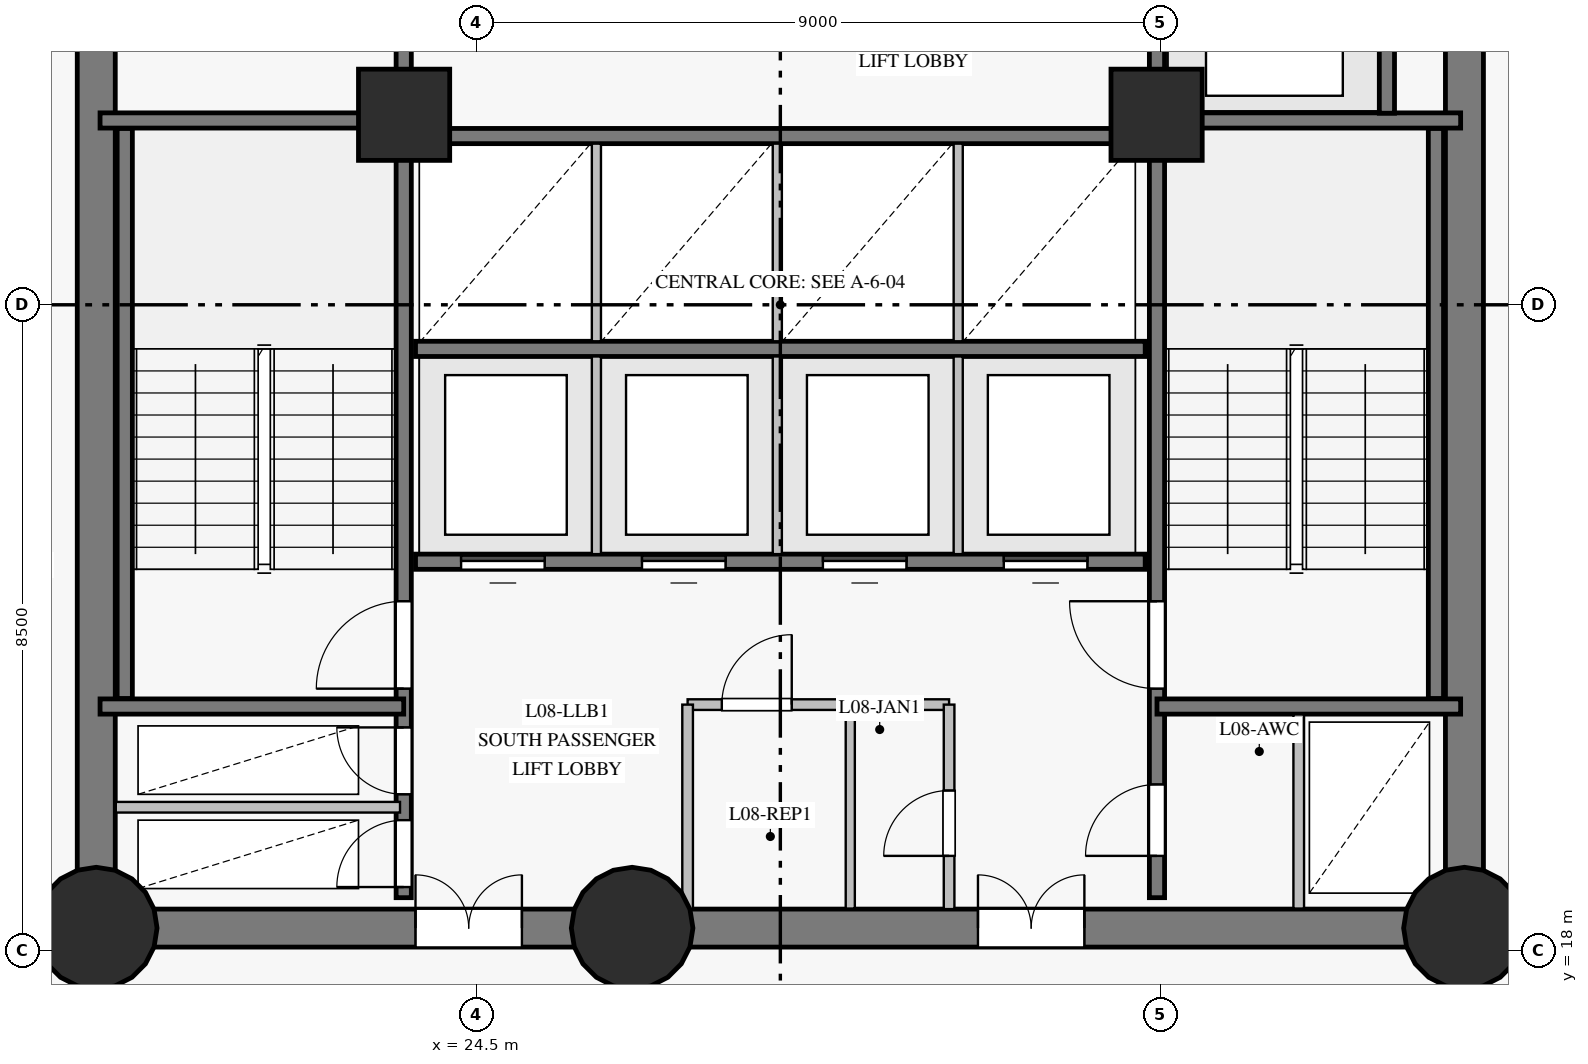
"""IFC4 building model, lengths in metres.
Left out: names, types, materials, properties, quantities, classifications, styles, units other than length and angle.
Written with IfcOpenShell. Run it as: python <this file> out.ifc"""

import sys

from ifc_helpers import new_model, si_unit, direction, frame, frame_2d, origin, origin_with_axes, origin_2d, place, context, subcontext, project, spatial, rectangle, circle, extrude, source, transform, mapped, element, fill, save


model = new_model("IFC4")
c1 = context("Model", 3, precision=1e-05, world=origin(), true_north=direction((0.0, 1.0)))
c2 = subcontext(c1, "Body", "Model", "MODEL_VIEW")
j1 = project(units=[si_unit("LENGTHUNIT", "METRE"), si_unit("PLANEANGLEUNIT", "RADIAN")], contexts=[c1])
p1 = place(None, origin())
s1 = spatial("IfcSite", under=j1, at=p1, CompositionType="ELEMENT")
p2 = place(p1, origin())
s2 = spatial("IfcBuilding", under=s1, at=p2, CompositionType="ELEMENT")
p3 = place(p2, frame((0.0, 0.0, 33.7)))
s3 = spatial("IfcBuildingStorey", under=s2, at=p3, CompositionType="ELEMENT", Elevation=33.7)
p4 = place(p3, frame((19.5, 18.3, 0.0), z_axis=(0.0, 0.0, 1.0), x_axis=(1.0, 0.0, 0.0)))
e1 = element("IfcWall", 1, at=p4, inside=s3, PredefinedType="SHEAR", context=c2, shape_type="SweptSolid", body=[
    extrude(rectangle(XDim=7.05, YDim=0.5, at=frame_2d((3.525, 0.0))), origin(), (0.0, 0.0, 1.0), 3.35),
])
p5 = place(p4, frame((4.2, 0.0, 0.0)))
e2 = element("IfcOpeningElement", 2, at=p5, cuts=e1, PredefinedType="OPENING", context=c2, shape_type="SweptSolid", body=[
    extrude(rectangle(XDim=1.4, YDim=2.2, at=frame_2d((0.7, 1.1))), frame((0.0, 0.26, 0.0), z_axis=(0.0, -1.0, 0.0), x_axis=(1.0, 0.0, 0.0)), (0.0, 0.0, 1.0), 0.52),
])
p6 = place(p3, frame((26.55, 18.3, 0.0), z_axis=(0.0, 0.0, 1.0), x_axis=(1.0, 0.0, 0.0)))
e3 = element("IfcWall", 3, at=p6, inside=s3, PredefinedType="SHEAR", context=c2, shape_type="SweptSolid", body=[
    extrude(rectangle(XDim=10.95, YDim=0.5, at=frame_2d((5.475, 0.0))), origin(), (0.0, 0.0, 1.0), 3.35),
])
p7 = place(p6, frame((4.55, 0.0, 0.0)))
e4 = element("IfcOpeningElement", 4, at=p7, cuts=e3, PredefinedType="OPENING", context=c2, shape_type="SweptSolid", body=[
    extrude(rectangle(XDim=1.4, YDim=2.2, at=frame_2d((0.7, 1.1))), frame((0.0, 0.26, 0.0), z_axis=(0.0, -1.0, 0.0), x_axis=(1.0, 0.0, 0.0)), (0.0, 0.0, 1.0), 0.52),
])
p8 = place(p3, frame((37.5, 18.3, 0.0), z_axis=(0.0, 0.0, 1.0), x_axis=(0.0, 1.0, 0.0)))
e5 = element("IfcWall", 5, at=p8, inside=s3, PredefinedType="SHEAR", context=c2, shape_type="SweptSolid", body=[
    extrude(rectangle(XDim=16.4, YDim=0.5, at=frame_2d((8.2, 0.0))), origin(), (0.0, 0.0, 1.0), 3.35),
])
p9 = place(p8, frame((14.06, 0.0, 0.0)))
e6 = element("IfcOpeningElement", 6, at=p9, cuts=e5, PredefinedType="OPENING", context=c2, shape_type="SweptSolid", body=[
    extrude(rectangle(XDim=1.2, YDim=2.15, at=frame_2d((0.6, 1.075))), frame((0.0, 0.26, 0.0), z_axis=(0.0, -1.0, 0.0), x_axis=(1.0, 0.0, 0.0)), (0.0, 0.0, 1.0), 0.52),
])
p10 = place(p3, frame((19.5, 34.7, 0.0), z_axis=(0.0, 0.0, 1.0), x_axis=(0.0, -1.0, 0.0)))
e7 = element("IfcWall", 7, at=p10, inside=s3, PredefinedType="SHEAR", context=c2, shape_type="SweptSolid", body=[
    extrude(rectangle(XDim=16.4, YDim=0.5, at=frame_2d((8.2, 0.0))), origin(), (0.0, 0.0, 1.0), 3.35),
])
p11 = place(p10, frame((3.1, 0.0, 0.0)))
e8 = element("IfcOpeningElement", 8, at=p11, cuts=e7, PredefinedType="OPENING", context=c2, shape_type="SweptSolid", body=[
    extrude(rectangle(XDim=1.1, YDim=2.15, at=frame_2d((0.55, 1.075))), frame((0.0, 0.26, 0.0), z_axis=(0.0, -1.0, 0.0), x_axis=(1.0, 0.0, 0.0)), (0.0, 0.0, 1.0), 0.52),
])
m1 = source(origin_with_axes(), c2, "Body", "SweptSolid", [
    extrude(circle(Radius=0.8, at=origin_2d()), origin(), (0.0, 0.0, 1.0), 3.6),
])
for number, where, z_axis, x_axis in (
    (9, (19.5, 18.3, 0.0), (0.0, 0.0, 1.0), (1.0, 0.0, 0.0)),
    (10, (26.55, 18.3, 0.0), (0.0, 0.0, 1.0), (1.0, 0.0, 0.0)),
    (11, (37.5, 18.3, 0.0), (0.0, 0.0, 1.0), (1.0, 0.0, 0.0)),
):
    element("IfcColumn", number, at=place(p3, frame(where, z_axis=z_axis, x_axis=x_axis)), inside=s3, PredefinedType="COLUMN", context=c2, shape_type="MappedRepresentation", body=[
        mapped(m1, transform((0.0, 0.0, 0.0), scale=1.0)),
    ])
m2 = source(origin_with_axes(), c2, "Body", "SweptSolid", [
    extrude(rectangle(XDim=1.2, YDim=1.2, at=origin_2d()), origin(), (0.0, 0.0, 1.0), 3.6),
])
for number, where, z_axis, x_axis in (
    (12, (23.55, 29.0, 0.0), (0.0, 0.0, 1.0), (1.0, 0.0, 0.0)),
    (13, (33.45, 29.0, 0.0), (0.0, 0.0, 1.0), (1.0, 0.0, 0.0)),
):
    element("IfcColumn", number, at=place(p3, frame(where, z_axis=z_axis, x_axis=x_axis)), inside=s3, PredefinedType="COLUMN", context=c2, shape_type="MappedRepresentation", body=[
        mapped(m2, transform((0.0, 0.0, 0.0), scale=1.0)),
    ])
p12 = place(p3, frame((23.545, 18.7, 0.0), z_axis=(0.0, 0.0, 1.0), x_axis=(0.0, 1.0, 0.0)))
e14 = element("IfcWall", 14, at=p12, inside=s3, PredefinedType="SHEAR", context=c2, shape_type="SweptSolid", body=[
    extrude(rectangle(XDim=15.6, YDim=0.2, at=frame_2d((7.8, 0.0))), origin(), (0.0, 0.0, 1.0), 3.35),
])
p13 = place(p12, frame((2.75, 0.0, 0.0)))
e15 = element("IfcOpeningElement", 15, at=p13, cuts=e14, PredefinedType="OPENING", context=c2, shape_type="SweptSolid", body=[
    extrude(rectangle(XDim=1.15, YDim=2.15, at=frame_2d((0.575, 1.075))), frame((0.0, 0.11, 0.0), z_axis=(0.0, -1.0, 0.0), x_axis=(1.0, 0.0, 0.0)), (0.0, 0.0, 1.0), 0.22),
])
p14 = place(p12, frame((0.14, 0.0, 0.0)))
e16 = element("IfcOpeningElement", 16, at=p14, cuts=e14, PredefinedType="OPENING", context=c2, shape_type="SweptSolid", body=[
    extrude(rectangle(XDim=0.88, YDim=2.1, at=frame_2d((0.44, 1.05))), frame((0.0, 0.11, 0.0), z_axis=(0.0, -1.0, 0.0), x_axis=(1.0, 0.0, 0.0)), (0.0, 0.0, 1.0), 0.22),
])
p15 = place(p12, frame((1.36, 0.0, 0.0)))
e17 = element("IfcOpeningElement", 17, at=p15, cuts=e14, PredefinedType="OPENING", context=c2, shape_type="SweptSolid", body=[
    extrude(rectangle(XDim=0.88, YDim=2.1, at=frame_2d((0.44, 1.05))), frame((0.0, 0.11, 0.0), z_axis=(0.0, -1.0, 0.0), x_axis=(1.0, 0.0, 0.0)), (0.0, 0.0, 1.0), 0.22),
])
p16 = place(p12, frame((12.1, 0.0, 0.0)))
e18 = element("IfcOpeningElement", 18, at=p16, cuts=e14, PredefinedType="OPENING", context=c2, shape_type="SweptSolid", body=[
    extrude(rectangle(XDim=1.12, YDim=2.15, at=frame_2d((0.56, 1.075))), frame((0.0, 0.11, 0.0), z_axis=(0.0, -1.0, 0.0), x_axis=(1.0, 0.0, 0.0)), (0.0, 0.0, 1.0), 0.22),
])
p17 = place(p12, frame((14.05, 0.0, 0.0)))
e19 = element("IfcOpeningElement", 19, at=p17, cuts=e14, PredefinedType="OPENING", context=c2, shape_type="SweptSolid", body=[
    extrude(rectangle(XDim=1.12, YDim=2.15, at=frame_2d((0.56, 1.075))), frame((0.0, 0.11, 0.0), z_axis=(0.0, -1.0, 0.0), x_axis=(1.0, 0.0, 0.0)), (0.0, 0.0, 1.0), 0.22),
])
p18 = place(p3, frame((33.455, 18.7, 0.0), z_axis=(0.0, 0.0, 1.0), x_axis=(0.0, 1.0, 0.0)))
e20 = element("IfcWall", 20, at=p18, inside=s3, PredefinedType="SHEAR", context=c2, shape_type="SweptSolid", body=[
    extrude(rectangle(XDim=15.6, YDim=0.2, at=frame_2d((7.8, 0.0))), origin(), (0.0, 0.0, 1.0), 3.35),
])
p19 = place(p18, frame((2.75, 0.0, 0.0)))
e21 = element("IfcOpeningElement", 21, at=p19, cuts=e20, PredefinedType="OPENING", context=c2, shape_type="SweptSolid", body=[
    extrude(rectangle(XDim=1.15, YDim=2.15, at=frame_2d((0.575, 1.075))), frame((0.0, 0.11, 0.0), z_axis=(0.0, -1.0, 0.0), x_axis=(1.0, 0.0, 0.0)), (0.0, 0.0, 1.0), 0.22),
])
p20 = place(p18, frame((0.55, 0.0, 0.0)))
e22 = element("IfcOpeningElement", 22, at=p20, cuts=e20, PredefinedType="OPENING", context=c2, shape_type="SweptSolid", body=[
    extrude(rectangle(XDim=0.94, YDim=2.1, at=frame_2d((0.47, 1.05))), frame((0.0, 0.11, 0.0), z_axis=(0.0, -1.0, 0.0), x_axis=(1.0, 0.0, 0.0)), (0.0, 0.0, 1.0), 0.22),
])
p21 = place(p3, frame((23.7, 23.12, 0.0), z_axis=(0.0, 0.0, 1.0), x_axis=(1.0, 0.0, 0.0)))
e23 = element("IfcWall", 23, at=p21, inside=s3, PredefinedType="SHEAR", context=c2, shape_type="SweptSolid", body=[
    extrude(rectangle(XDim=9.6, YDim=0.2, at=frame_2d((4.8, 0.0))), origin(), (0.0, 0.0, 1.0), 3.35),
])
p22 = place(p21, frame((0.6, 0.0, 0.0)))
e24 = element("IfcOpeningElement", 24, at=p22, cuts=e23, PredefinedType="OPENING", context=c2, shape_type="SweptSolid", body=[
    extrude(rectangle(XDim=1.1, YDim=2.15, at=frame_2d((0.55, 1.075))), frame((0.0, 0.11, 0.0), z_axis=(0.0, -1.0, 0.0), x_axis=(1.0, 0.0, 0.0)), (0.0, 0.0, 1.0), 0.22),
])
p23 = place(p21, frame((2.98, 0.0, 0.0)))
e25 = element("IfcOpeningElement", 25, at=p23, cuts=e23, PredefinedType="OPENING", context=c2, shape_type="SweptSolid", body=[
    extrude(rectangle(XDim=1.1, YDim=2.15, at=frame_2d((0.55, 1.075))), frame((0.0, 0.11, 0.0), z_axis=(0.0, -1.0, 0.0), x_axis=(1.0, 0.0, 0.0)), (0.0, 0.0, 1.0), 0.22),
])
p24 = place(p21, frame((5.36, 0.0, 0.0)))
e26 = element("IfcOpeningElement", 26, at=p24, cuts=e23, PredefinedType="OPENING", context=c2, shape_type="SweptSolid", body=[
    extrude(rectangle(XDim=1.1, YDim=2.15, at=frame_2d((0.55, 1.075))), frame((0.0, 0.11, 0.0), z_axis=(0.0, -1.0, 0.0), x_axis=(1.0, 0.0, 0.0)), (0.0, 0.0, 1.0), 0.22),
])
p25 = place(p21, frame((7.74, 0.0, 0.0)))
e27 = element("IfcOpeningElement", 27, at=p25, cuts=e23, PredefinedType="OPENING", context=c2, shape_type="SweptSolid", body=[
    extrude(rectangle(XDim=1.1, YDim=2.15, at=frame_2d((0.55, 1.075))), frame((0.0, 0.11, 0.0), z_axis=(0.0, -1.0, 0.0), x_axis=(1.0, 0.0, 0.0)), (0.0, 0.0, 1.0), 0.22),
])
for number, where, z_axis, x_axis in (
    (28, (23.7, 25.92, 0.0), (0.0, 0.0, 1.0), (1.0, 0.0, 0.0)),
    (29, (23.7, 28.72, 0.0), (0.0, 0.0, 1.0), (1.0, 0.0, 0.0)),
):
    element("IfcWall", number, at=place(p3, frame(where, z_axis=z_axis, x_axis=x_axis)), inside=s3, PredefinedType="SHEAR", context=c2, shape_type="SweptSolid", body=[
        extrude(rectangle(XDim=9.6, YDim=0.2, at=frame_2d((4.8, 0.0))), origin(), (0.0, 0.0, 1.0), 3.35),
    ])
for number, where, z_axis, x_axis in (
    (30, (19.875, 21.32, 0.0), (0.0, 0.0, 1.0), (0.0, 1.0, 0.0)),
    (31, (37.125, 21.32, 0.0), (0.0, 0.0, 1.0), (0.0, 1.0, 0.0)),
):
    element("IfcWall", number, at=place(p3, frame(where, z_axis=z_axis, x_axis=x_axis)), inside=s3, PredefinedType="SHEAR", context=c2, shape_type="SweptSolid", body=[
        extrude(rectangle(XDim=7.5, YDim=0.2, at=frame_2d((3.75, 0.0))), origin(), (0.0, 0.0, 1.0), 3.35),
    ])
for number, where, z_axis, x_axis in (
    (32, (33.455, 21.215, 0.0), (0.0, 0.0, 1.0), (1.0, 0.0, 0.0)),
    (33, (33.455, 28.925, 0.0), (0.0, 0.0, 1.0), (1.0, 0.0, 0.0)),
    (34, (19.55, 21.215, 0.0), (0.0, 0.0, 1.0), (1.0, 0.0, 0.0)),
    (35, (19.55, 28.925, 0.0), (0.0, 0.0, 1.0), (1.0, 0.0, 0.0)),
):
    element("IfcWall", number, at=place(p3, frame(where, z_axis=z_axis, x_axis=x_axis)), inside=s3, PredefinedType="SHEAR", context=c2, shape_type="SweptSolid", body=[
        extrude(rectangle(XDim=3.995, YDim=0.2, at=frame_2d((1.998, 0.0))), origin(), (0.0, 0.0, 1.0), 3.35),
    ])
p26 = place(p3, frame((36.48, 29.02, 0.0), z_axis=(0.0, 0.0, 1.0), x_axis=(0.0, 1.0, 0.0)))
e36 = element("IfcWall", 36, at=p26, inside=s3, PredefinedType="SHEAR", context=c2, shape_type="SweptSolid", body=[
    extrude(rectangle(XDim=2.86, YDim=0.2, at=frame_2d((1.43, 0.0))), origin(), (0.0, 0.0, 1.0), 3.35),
])
p27 = place(p3, frame((19.757, 19.89, 0.0), z_axis=(0.0, 0.0, 1.0), x_axis=(1.0, 0.0, 0.0)))
e37 = element("IfcWall", 37, at=p27, inside=s3, PredefinedType="PARTITIONING", context=c2, shape_type="SweptSolid", body=[
    extrude(rectangle(XDim=3.739, YDim=0.14, at=frame_2d((1.87, 0.0))), origin(), (0.0, 0.0, 1.0), 3.35),
])
p28 = place(p3, frame((27.28, 21.24, 0.0), z_axis=(0.0, 0.0, 1.0), x_axis=(1.0, 0.0, 0.0)))
e38 = element("IfcWall", 38, at=p28, inside=s3, PredefinedType="PARTITIONING", context=c2, shape_type="SweptSolid", body=[
    extrude(rectangle(XDim=3.44, YDim=0.14, at=frame_2d((1.72, 0.0))), origin(), (0.0, 0.0, 1.0), 3.35),
])
p29 = place(p28, frame((0.45, 0.0, 0.0)))
e39 = element("IfcOpeningElement", 39, at=p29, cuts=e38, PredefinedType="OPENING", context=c2, shape_type="SweptSolid", body=[
    extrude(rectangle(XDim=0.92, YDim=2.1, at=frame_2d((0.46, 1.05))), frame((0.0, 0.08, 0.0), z_axis=(0.0, -1.0, 0.0), x_axis=(1.0, 0.0, 0.0)), (0.0, 0.0, 1.0), 0.16),
])
p30 = place(p3, frame((27.28, 18.55, 0.0), z_axis=(0.0, 0.0, 1.0), x_axis=(0.0, 1.0, 0.0)))
e40 = element("IfcWall", 40, at=p30, inside=s3, PredefinedType="PARTITIONING", context=c2, shape_type="SweptSolid", body=[
    extrude(rectangle(XDim=2.69, YDim=0.14, at=frame_2d((1.345, 0.0))), origin(), (0.0, 0.0, 1.0), 3.35),
])
p31 = place(p3, frame((30.72, 18.55, 0.0), z_axis=(0.0, 0.0, 1.0), x_axis=(0.0, 1.0, 0.0)))
e41 = element("IfcWall", 41, at=p31, inside=s3, PredefinedType="PARTITIONING", context=c2, shape_type="SweptSolid", body=[
    extrude(rectangle(XDim=2.69, YDim=0.14, at=frame_2d((1.345, 0.0))), origin(), (0.0, 0.0, 1.0), 3.35),
])
p32 = place(p31, frame((0.7, 0.0, 0.0)))
e42 = element("IfcOpeningElement", 42, at=p32, cuts=e41, PredefinedType="OPENING", context=c2, shape_type="SweptSolid", body=[
    extrude(rectangle(XDim=0.86, YDim=2.1, at=frame_2d((0.43, 1.05))), frame((0.0, 0.08, 0.0), z_axis=(0.0, -1.0, 0.0), x_axis=(1.0, 0.0, 0.0)), (0.0, 0.0, 1.0), 0.16),
])
for number, where, z_axis, x_axis in (
    (43, (26.08, 23.22, 0.0), (0.0, 0.0, 1.0), (0.0, 1.0, 0.0)),
    (44, (28.46, 23.22, 0.0), (0.0, 0.0, 1.0), (0.0, 1.0, 0.0)),
    (45, (30.84, 23.22, 0.0), (0.0, 0.0, 1.0), (0.0, 1.0, 0.0)),
    (46, (26.08, 26.02, 0.0), (0.0, 0.0, 1.0), (0.0, 1.0, 0.0)),
    (47, (28.46, 26.02, 0.0), (0.0, 0.0, 1.0), (0.0, 1.0, 0.0)),
    (48, (30.84, 26.02, 0.0), (0.0, 0.0, 1.0), (0.0, 1.0, 0.0)),
):
    element("IfcWall", number, at=place(p3, frame(where, z_axis=z_axis, x_axis=x_axis)), inside=s3, PredefinedType="PARTITIONING", context=c2, shape_type="SweptSolid", body=[
        extrude(rectangle(XDim=2.6, YDim=0.12, at=frame_2d((1.3, 0.0))), origin(), (0.0, 0.0, 1.0), 3.35),
    ])
p33 = place(p3, frame((29.42, 18.557, 0.0), z_axis=(0.0, 0.0, 1.0), x_axis=(0.0, 1.0, 0.0)))
e49 = element("IfcWall", 49, at=p33, inside=s3, PredefinedType="PARTITIONING", context=c2, shape_type="SweptSolid", body=[
    extrude(rectangle(XDim=2.611, YDim=0.12, at=frame_2d((1.306, 0.0))), origin(), (0.0, 0.0, 1.0), 3.35),
])
p34 = place(p3, frame((35.32, 18.557, 0.0), z_axis=(0.0, 0.0, 1.0), x_axis=(0.0, 1.0, 0.0)))
e50 = element("IfcWall", 50, at=p34, inside=s3, PredefinedType="PARTITIONING", context=c2, shape_type="SweptSolid", body=[
    extrude(rectangle(XDim=2.553, YDim=0.14, at=frame_2d((1.277, 0.0))), origin(), (0.0, 0.0, 1.0), 3.35),
])
m3 = source(origin_with_axes(), c2, "Body", "SweptSolid", [
    extrude(rectangle(XDim=1.15, YDim=2.15, at=frame_2d((0.575, 1.075))), frame((0.0, 0.025, 0.0), z_axis=(0.0, -1.0, 0.0), x_axis=(1.0, 0.0, 0.0)), (0.0, 0.0, 1.0), 0.05),
])
p35 = place(p13, origin())
e51 = element("IfcDoor", 51, at=p35, inside=s3, OperationType="SINGLE_SWING_LEFT", PredefinedType="DOOR", context=c2, shape_type="MappedRepresentation", body=[
    mapped(m3, transform((0.0, 0.0, 0.0), scale=1.0)),
])
fill(e15, e51)
p36 = place(p19, origin())
e52 = element("IfcDoor", 52, at=p36, inside=s3, OperationType="SINGLE_SWING_RIGHT", PredefinedType="DOOR", context=c2, shape_type="MappedRepresentation", body=[
    mapped(m3, transform((0.0, 0.0, 0.0), scale=1.0)),
])
fill(e21, e52)
m4 = source(origin_with_axes(), c2, "Body", "SweptSolid", [
    extrude(rectangle(XDim=0.88, YDim=2.1, at=frame_2d((0.44, 1.05))), frame((0.0, 0.025, 0.0), z_axis=(0.0, -1.0, 0.0), x_axis=(1.0, 0.0, 0.0)), (0.0, 0.0, 1.0), 0.05),
])
p37 = place(p14, origin())
e53 = element("IfcDoor", 53, at=p37, inside=s3, OperationType="SINGLE_SWING_LEFT", PredefinedType="DOOR", context=c2, shape_type="MappedRepresentation", body=[
    mapped(m4, transform((0.0, 0.0, 0.0), scale=1.0)),
])
fill(e16, e53)
p38 = place(p15, origin())
e54 = element("IfcDoor", 54, at=p38, inside=s3, OperationType="SINGLE_SWING_RIGHT", PredefinedType="DOOR", context=c2, shape_type="MappedRepresentation", body=[
    mapped(m4, transform((0.0, 0.0, 0.0), scale=1.0)),
])
fill(e17, e54)
m5 = source(origin_with_axes(), c2, "Body", "SweptSolid", [
    extrude(rectangle(XDim=1.4, YDim=2.2, at=frame_2d((0.7, 1.1))), frame((0.0, 0.025, 0.0), z_axis=(0.0, -1.0, 0.0), x_axis=(1.0, 0.0, 0.0)), (0.0, 0.0, 1.0), 0.05),
])
p39 = place(p5, origin())
e55 = element("IfcDoor", 55, at=p39, inside=s3, OperationType="DOUBLE_DOOR_SINGLE_SWING", PredefinedType="DOOR", context=c2, shape_type="MappedRepresentation", body=[
    mapped(m5, transform((0.0, 0.0, 0.0), scale=1.0)),
])
fill(e2, e55)
p40 = place(p7, origin())
e56 = element("IfcDoor", 56, at=p40, inside=s3, OperationType="DOUBLE_DOOR_SINGLE_SWING", PredefinedType="DOOR", context=c2, shape_type="MappedRepresentation", body=[
    mapped(m5, transform((0.0, 0.0, 0.0), scale=1.0)),
])
fill(e4, e56)
m6 = source(origin_with_axes(), c2, "Body", "SweptSolid", [
    extrude(rectangle(XDim=0.94, YDim=2.1, at=frame_2d((0.47, 1.05))), frame((0.0, 0.025, 0.0), z_axis=(0.0, -1.0, 0.0), x_axis=(1.0, 0.0, 0.0)), (0.0, 0.0, 1.0), 0.05),
])
p41 = place(p20, origin())
e57 = element("IfcDoor", 57, at=p41, inside=s3, OperationType="SINGLE_SWING_LEFT", PredefinedType="DOOR", context=c2, shape_type="MappedRepresentation", body=[
    mapped(m6, transform((0.0, 0.0, 0.0), scale=1.0)),
])
fill(e22, e57)
m7 = source(origin_with_axes(), c2, "Body", "SweptSolid", [
    extrude(rectangle(XDim=0.92, YDim=2.1, at=frame_2d((0.46, 1.05))), frame((0.0, 0.025, 0.0), z_axis=(0.0, -1.0, 0.0), x_axis=(1.0, 0.0, 0.0)), (0.0, 0.0, 1.0), 0.05),
])
p42 = place(p29, origin())
e58 = element("IfcDoor", 58, at=p42, inside=s3, OperationType="SINGLE_SWING_RIGHT", PredefinedType="DOOR", context=c2, shape_type="MappedRepresentation", body=[
    mapped(m7, transform((0.0, 0.0, 0.0), scale=1.0)),
])
fill(e39, e58)
m8 = source(origin_with_axes(), c2, "Body", "SweptSolid", [
    extrude(rectangle(XDim=0.86, YDim=2.1, at=frame_2d((0.43, 1.05))), frame((0.0, 0.025, 0.0), z_axis=(0.0, -1.0, 0.0), x_axis=(1.0, 0.0, 0.0)), (0.0, 0.0, 1.0), 0.05),
])
p43 = place(p32, origin())
e59 = element("IfcDoor", 59, at=p43, inside=s3, OperationType="SINGLE_SWING_LEFT", PredefinedType="DOOR", context=c2, shape_type="MappedRepresentation", body=[
    mapped(m8, transform((0.0, 0.0, 0.0), scale=1.0)),
])
fill(e42, e59)
m9 = source(origin_with_axes(), c2, "Body", "SweptSolid", [
    extrude(rectangle(XDim=1.1, YDim=2.15, at=frame_2d((0.55, 1.075))), frame((0.0, 0.025, 0.0), z_axis=(0.0, -1.0, 0.0), x_axis=(1.0, 0.0, 0.0)), (0.0, 0.0, 1.0), 0.05),
])
p44 = place(p22, origin())
e60 = element("IfcDoor", 60, at=p44, inside=s3, OperationType="SLIDING_TO_LEFT", PredefinedType="DOOR", context=c2, shape_type="MappedRepresentation", body=[
    mapped(m9, transform((0.0, 0.0, 0.0), scale=1.0)),
])
fill(e24, e60)
p45 = place(p23, origin())
e61 = element("IfcDoor", 61, at=p45, inside=s3, OperationType="SLIDING_TO_RIGHT", PredefinedType="DOOR", context=c2, shape_type="MappedRepresentation", body=[
    mapped(m9, transform((0.0, 0.0, 0.0), scale=1.0)),
])
fill(e25, e61)
p46 = place(p24, origin())
e62 = element("IfcDoor", 62, at=p46, inside=s3, OperationType="SLIDING_TO_LEFT", PredefinedType="DOOR", context=c2, shape_type="MappedRepresentation", body=[
    mapped(m9, transform((0.0, 0.0, 0.0), scale=1.0)),
])
fill(e26, e62)
p47 = place(p25, origin())
e63 = element("IfcDoor", 63, at=p47, inside=s3, OperationType="SLIDING_TO_RIGHT", PredefinedType="DOOR", context=c2, shape_type="MappedRepresentation", body=[
    mapped(m9, transform((0.0, 0.0, 0.0), scale=1.0)),
])
fill(e27, e63)
save(model, sys.argv[1])
